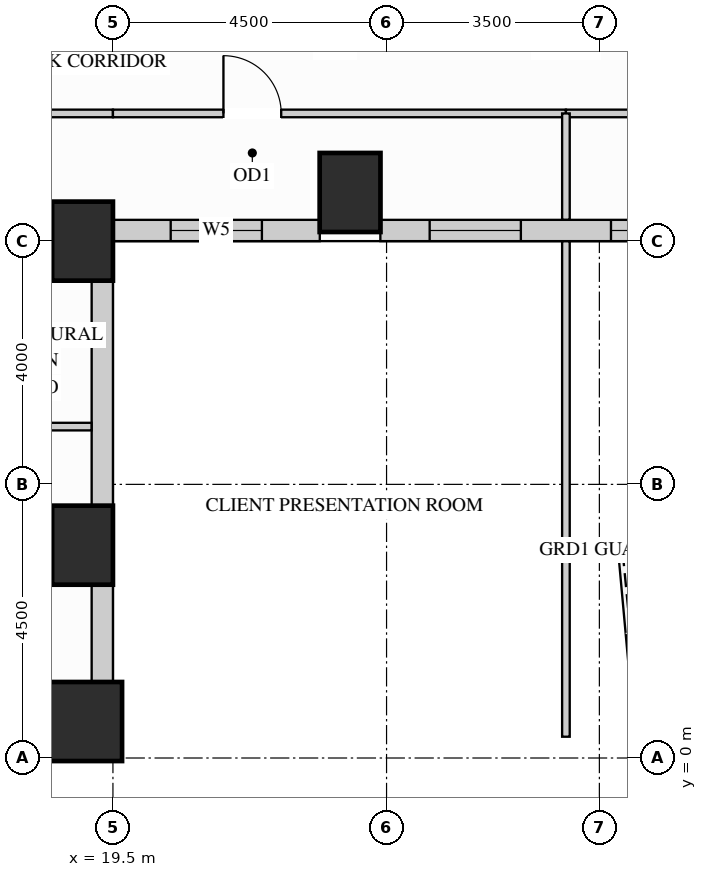
"""IFC4 building model, lengths in metres.
Left out: names, types, materials, properties, quantities, classifications, styles, units other than length and angle.
Written with IfcOpenShell. Run it as: python <this file> out.ifc"""

import sys

from ifc_helpers import new_model, si_unit, direction, frame, frame_2d, origin, origin_2d, place, context, subcontext, project, spatial, rectangle, extrude, source, transform, mapped, element, fill, save


model = new_model("IFC4")
c1 = context("Model", 3, precision=1e-05, world=origin(), true_north=direction((0.0, 1.0)))
c2 = subcontext(c1, "Body", "Model", "MODEL_VIEW")
j1 = project(units=[si_unit("LENGTHUNIT", "METRE"), si_unit("PLANEANGLEUNIT", "RADIAN")], contexts=[c1])
p1 = place(None, origin())
s1 = spatial("IfcSite", under=j1, at=p1, CompositionType="ELEMENT")
p2 = place(p1, origin())
s2 = spatial("IfcBuilding", under=s1, at=p2, CompositionType="ELEMENT")
p3 = place(p2, frame((0.0, 0.0, 47.7)))
s3 = spatial("IfcBuildingStorey", under=s2, at=p3, CompositionType="ELEMENT", Elevation=47.7)
m1 = source(origin(), c2, "Body", "SweptSolid", [
    extrude(rectangle(XDim=1.0, YDim=1.3, at=origin_2d()), origin(), (0.0, 0.0, 1.0), 3.38),
])
for number, where, z_axis, x_axis in (
    (1, (19.0, 3.5, 0.0), (0.0, 0.0, 1.0), (1.0, 0.0, 0.0)),
    (2, (19.0, 8.5, 0.0), (0.0, 0.0, 1.0), (1.0, 0.0, 0.0)),
    (3, (23.4, 9.3, 0.0), (0.0, 0.0, 1.0), (1.0, 0.0, 0.0)),
):
    element("IfcColumn", number, at=place(p3, frame(where, z_axis=z_axis, x_axis=x_axis)), inside=s3, PredefinedType="COLUMN", context=c2, shape_type="MappedRepresentation", body=[
        mapped(m1, transform((0.0, 0.0, 0.0), x_axis=(1.0, 0.0, 0.0), y_axis=(0.0, 1.0, 0.0), z_axis=(0.0, 0.0, 1.0))),
    ])
m2 = source(origin(), c2, "Body", "SweptSolid", [
    extrude(rectangle(XDim=1.3, YDim=1.3, at=origin_2d()), origin(), (0.0, 0.0, 1.0), 3.38),
])
p4 = place(p3, frame((19.0, 0.6, 0.0), z_axis=(0.0, 0.0, 1.0), x_axis=(1.0, 0.0, 0.0)))
e4 = element("IfcColumn", 4, at=p4, inside=s3, PredefinedType="COLUMN", context=c2, shape_type="MappedRepresentation", body=[
    mapped(m2, transform((0.0, 0.0, 0.0), x_axis=(1.0, 0.0, 0.0), y_axis=(0.0, 1.0, 0.0), z_axis=(0.0, 0.0, 1.0))),
])
m3 = source(origin(), c2, "Body", "SweptSolid", [
    extrude(rectangle(XDim=1.604, YDim=0.35, at=frame_2d((0.802, 0.0))), origin(), (0.0, 0.0, 1.0), 2.51),
])
p5 = place(p3, frame((19.325, 1.248, 0.0), z_axis=(0.0, 0.0, 1.0), x_axis=(0.0, 1.0, 0.0)))
e5 = element("IfcWall", 5, at=p5, inside=s3, PredefinedType="SOLIDWALL", context=c2, shape_type="MappedRepresentation", body=[
    mapped(m3, transform((0.0, 0.0, 0.0), x_axis=(1.0, 0.0, 0.0), y_axis=(0.0, 1.0, 0.0), z_axis=(0.0, 0.0, 1.0))),
])
m4 = source(origin(), c2, "Body", "SweptSolid", [
    extrude(rectangle(XDim=3.704, YDim=0.35, at=frame_2d((1.852, 0.0))), origin(), (0.0, 0.0, 1.0), 2.51),
])
p6 = place(p3, frame((19.325, 4.148, 0.0), z_axis=(0.0, 0.0, 1.0), x_axis=(0.0, 1.0, 0.0)))
e6 = element("IfcWall", 6, at=p6, inside=s3, PredefinedType="SOLIDWALL", context=c2, shape_type="MappedRepresentation", body=[
    mapped(m4, transform((0.0, 0.0, 0.0), x_axis=(1.0, 0.0, 0.0), y_axis=(0.0, 1.0, 0.0), z_axis=(0.0, 0.0, 1.0))),
])
p7 = place(p3, frame((19.498, 8.675, 0.0), z_axis=(0.0, 0.0, 1.0), x_axis=(1.0, 0.0, 0.0)))
e7 = element("IfcWall", 7, at=p7, inside=s3, PredefinedType="SOLIDWALL", context=c2, shape_type="SweptSolid", body=[
    extrude(rectangle(XDim=3.404, YDim=0.35, at=frame_2d((1.702, 0.0))), origin(), (0.0, 0.0, 1.0), 3.365),
])
p8 = place(p7, frame((0.952, 0.0, 0.78)))
e8 = element("IfcOpeningElement", 8, at=p8, cuts=e7, PredefinedType="OPENING", context=c2, shape_type="SweptSolid", body=[
    extrude(rectangle(XDim=1.5, YDim=2.0, at=frame_2d((0.75, 1.0))), frame((0.0, 0.185, 0.0), z_axis=(0.0, -1.0, 0.0), x_axis=(1.0, 0.0, 0.0)), (0.0, 0.0, 1.0), 0.37),
])
p9 = place(p3, frame((23.898, 8.675, 0.0), z_axis=(0.0, 0.0, 1.0), x_axis=(1.0, 0.0, 0.0)))
e9 = element("IfcWall", 9, at=p9, inside=s3, PredefinedType="SOLIDWALL", context=c2, shape_type="SweptSolid", body=[
    extrude(rectangle(XDim=6.104, YDim=0.35, at=frame_2d((3.052, 0.0))), origin(), (0.0, 0.0, 1.0), 3.365),
])
p10 = place(p9, frame((0.811, 0.0, 0.78)))
e10 = element("IfcOpeningElement", 10, at=p10, cuts=e9, PredefinedType="OPENING", context=c2, shape_type="SweptSolid", body=[
    extrude(rectangle(XDim=1.5, YDim=2.0, at=frame_2d((0.75, 1.0))), frame((0.0, 0.185, 0.0), z_axis=(0.0, -1.0, 0.0), x_axis=(1.0, 0.0, 0.0)), (0.0, 0.0, 1.0), 0.37),
])
p11 = place(p9, frame((3.793, 0.0, 0.78)))
e11 = element("IfcOpeningElement", 11, at=p11, cuts=e9, PredefinedType="OPENING", context=c2, shape_type="SweptSolid", body=[
    extrude(rectangle(XDim=1.5, YDim=2.0, at=frame_2d((0.75, 1.0))), frame((0.0, 0.185, 0.0), z_axis=(0.0, -1.0, 0.0), x_axis=(1.0, 0.0, 0.0)), (0.0, 0.0, 1.0), 0.37),
])
m5 = source(origin(), c2, "Body", "SweptSolid", [
    extrude(rectangle(XDim=2.45, YDim=0.125, at=frame_2d((1.225, 0.0))), origin(), (0.0, 0.0, 1.0), 3.365),
])
p12 = place(p3, frame((17.05, 10.6, 0.0), z_axis=(0.0, 0.0, 1.0), x_axis=(1.0, 0.0, 0.0)))
e12 = element("IfcWall", 12, at=p12, inside=s3, PredefinedType="PARTITIONING", context=c2, shape_type="MappedRepresentation", body=[
    mapped(m5, transform((0.0, 0.0, 0.0), x_axis=(1.0, 0.0, 0.0), y_axis=(0.0, 1.0, 0.0), z_axis=(0.0, 0.0, 1.0))),
])
p13 = place(p3, frame((19.5, 10.6, 0.0), z_axis=(0.0, 0.0, 1.0), x_axis=(1.0, 0.0, 0.0)))
e13 = element("IfcWall", 13, at=p13, inside=s3, PredefinedType="PARTITIONING", context=c2, shape_type="SweptSolid", body=[
    extrude(rectangle(XDim=7.45, YDim=0.125, at=frame_2d((3.725, 0.0))), origin(), (0.0, 0.0, 1.0), 3.365),
])
p14 = place(p13, frame((1.817, 0.0, 0.0)))
e14 = element("IfcOpeningElement", 14, at=p14, cuts=e13, PredefinedType="OPENING", context=c2, shape_type="SweptSolid", body=[
    extrude(rectangle(XDim=0.95, YDim=2.15, at=frame_2d((0.475, 1.075))), frame((0.0, 0.073, 0.0), z_axis=(0.0, -1.0, 0.0), x_axis=(1.0, 0.0, 0.0)), (0.0, 0.0, 1.0), 0.145),
])
p15 = place(p3, frame((26.95, 10.6, 0.0), z_axis=(0.0, 0.0, 1.0), x_axis=(1.0, 0.0, 0.0)))
e15 = element("IfcWall", 15, at=p15, inside=s3, PredefinedType="PARTITIONING", context=c2, shape_type="SweptSolid", body=[
    extrude(rectangle(XDim=7.45, YDim=0.125, at=frame_2d((3.725, 0.0))), origin(), (0.0, 0.0, 1.0), 3.365),
])
p16 = place(p15, frame((4.683, 0.0, 0.0)))
e16 = element("IfcOpeningElement", 16, at=p16, cuts=e15, PredefinedType="OPENING", context=c2, shape_type="SweptSolid", body=[
    extrude(rectangle(XDim=0.95, YDim=2.15, at=frame_2d((0.475, 1.075))), frame((0.0, 0.073, 0.0), z_axis=(0.0, -1.0, 0.0), x_axis=(1.0, 0.0, 0.0)), (0.0, 0.0, 1.0), 0.145),
])
m6 = source(origin(), c2, "Body", "SweptSolid", [
    extrude(rectangle(XDim=8.148, YDim=0.125, at=frame_2d((4.074, 0.0))), origin(), (0.0, 0.0, 1.0), 3.365),
])
p17 = place(p3, frame((26.95, 0.35, 0.0), z_axis=(0.0, 0.0, 1.0), x_axis=(0.0, 1.0, 0.0)))
e17 = element("IfcWall", 17, at=p17, inside=s3, PredefinedType="PARTITIONING", context=c2, shape_type="MappedRepresentation", body=[
    mapped(m6, transform((0.0, 0.0, 0.0), x_axis=(1.0, 0.0, 0.0), y_axis=(0.0, 1.0, 0.0), z_axis=(0.0, 0.0, 1.0))),
])
m7 = source(origin(), c2, "Body", "SweptSolid", [
    extrude(rectangle(XDim=1.748, YDim=0.125, at=frame_2d((0.874, 0.0))), origin(), (0.0, 0.0, 1.0), 3.365),
])
p18 = place(p3, frame((26.95, 8.852, 0.0), z_axis=(0.0, 0.0, 1.0), x_axis=(0.0, 1.0, 0.0)))
e18 = element("IfcWall", 18, at=p18, inside=s3, PredefinedType="PARTITIONING", context=c2, shape_type="MappedRepresentation", body=[
    mapped(m7, transform((0.0, 0.0, 0.0), x_axis=(1.0, 0.0, 0.0), y_axis=(0.0, 1.0, 0.0), z_axis=(0.0, 0.0, 1.0))),
])
m8 = source(origin(), c2, "Body", "SweptSolid", [
    extrude(rectangle(XDim=2.098, YDim=0.125, at=frame_2d((1.049, 0.0))), origin(), (0.0, 0.0, 1.0), 3.365),
])
p19 = place(p3, frame((17.05, 5.45, 0.0), z_axis=(0.0, 0.0, 1.0), x_axis=(1.0, 0.0, 0.0)))
e19 = element("IfcWall", 19, at=p19, inside=s3, PredefinedType="PARTITIONING", context=c2, shape_type="MappedRepresentation", body=[
    mapped(m8, transform((0.0, 0.0, 0.0), x_axis=(1.0, 0.0, 0.0), y_axis=(0.0, 1.0, 0.0), z_axis=(0.0, 0.0, 1.0))),
])
m9 = source(origin(), c2, "Body", "SweptSolid", [
    extrude(rectangle(XDim=0.95, YDim=2.15, at=frame_2d((0.475, 1.075))), frame((0.0, 0.025, 0.0), z_axis=(0.0, -1.0, 0.0), x_axis=(1.0, 0.0, 0.0)), (0.0, 0.0, 1.0), 0.05),
])
p20 = place(p14, origin())
e20 = element("IfcDoor", 20, at=p20, inside=s3, OperationType="SINGLE_SWING_LEFT", PredefinedType="DOOR", context=c2, shape_type="MappedRepresentation", body=[
    mapped(m9, transform((0.0, 0.0, 0.0), x_axis=(1.0, 0.0, 0.0), y_axis=(0.0, 1.0, 0.0), z_axis=(0.0, 0.0, 1.0))),
])
fill(e14, e20)
m10 = source(origin(), c2, "Body", "SweptSolid", [
    extrude(rectangle(XDim=1.5, YDim=2.0, at=frame_2d((0.75, 1.0))), frame((0.0, 0.03, 0.0), z_axis=(0.0, -1.0, 0.0), x_axis=(1.0, 0.0, 0.0)), (0.0, 0.0, 1.0), 0.06),
])
p21 = place(p8, origin())
e21 = element("IfcWindow", 21, at=p21, inside=s3, PartitioningType="SINGLE_PANEL", PredefinedType="WINDOW", context=c2, shape_type="MappedRepresentation", body=[
    mapped(m10, transform((0.0, 0.0, 0.0), x_axis=(1.0, 0.0, 0.0), y_axis=(0.0, 1.0, 0.0), z_axis=(0.0, 0.0, 1.0))),
])
fill(e8, e21)
p22 = place(p10, origin())
e22 = element("IfcWindow", 22, at=p22, inside=s3, PartitioningType="SINGLE_PANEL", PredefinedType="WINDOW", context=c2, shape_type="MappedRepresentation", body=[
    mapped(m10, transform((0.0, 0.0, 0.0), x_axis=(1.0, 0.0, 0.0), y_axis=(0.0, 1.0, 0.0), z_axis=(0.0, 0.0, 1.0))),
])
fill(e10, e22)
p23 = place(p11, origin())
e23 = element("IfcWindow", 23, at=p23, inside=s3, PartitioningType="SINGLE_PANEL", PredefinedType="WINDOW", context=c2, shape_type="MappedRepresentation", body=[
    mapped(m10, transform((0.0, 0.0, 0.0), x_axis=(1.0, 0.0, 0.0), y_axis=(0.0, 1.0, 0.0), z_axis=(0.0, 0.0, 1.0))),
])
fill(e11, e23)
save(model, sys.argv[1])
